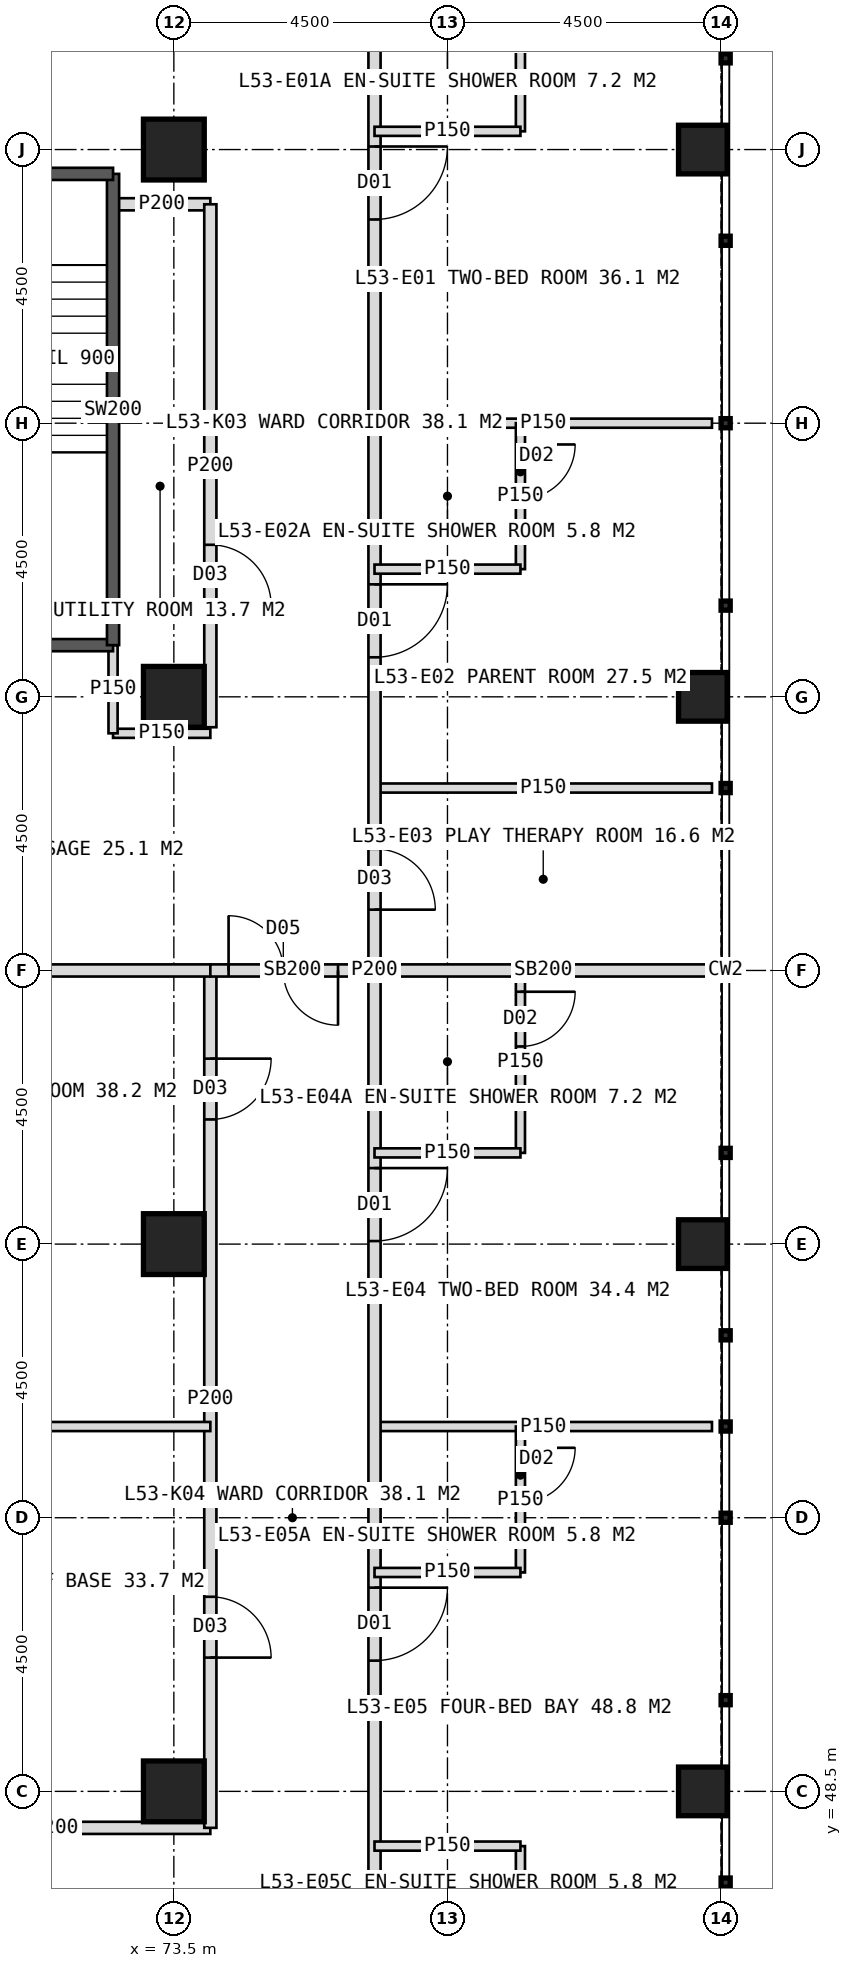
"""IFC4 building model, lengths in metres.
Left out: names, types, materials, properties, quantities, classifications, styles, units other than length and angle.
Written with IfcOpenShell. Run it as: python <this file> out.ifc"""

import sys

from ifc_helpers import new_model, si_unit, direction, frame, frame_2d, origin, origin_2d, place, context, subcontext, project, spatial, rectangle, hollow_rectangle, extrude, element, fill, save


model = new_model("IFC4")
c1 = context("Model", 3, precision=1e-05, world=origin(), true_north=direction((0.0, 1.0)))
c2 = subcontext(c1, "Body", "Model", "MODEL_VIEW")
j1 = project(units=[si_unit("LENGTHUNIT", "METRE"), si_unit("PLANEANGLEUNIT", "RADIAN")], contexts=[c1])
p1 = place(None, origin())
s1 = spatial("IfcSite", under=j1, at=p1, CompositionType="ELEMENT")
p2 = place(p1, origin())
s2 = spatial("IfcBuilding", under=s1, at=p2, CompositionType="ELEMENT")
p3 = place(p2, frame((0.0, 0.0, 221.0)))
s3 = spatial("IfcBuildingStorey", under=s2, at=p3, CompositionType="ELEMENT", Elevation=221.0)
for number, where, z_axis, x_axis in (
    (1, (73.5, 48.5, 0.0), (0.0, 0.0, 1.0), (1.0, 0.0, 0.0)),
    (2, (73.5, 75.5, 0.0), (0.0, 0.0, 1.0), (1.0, 0.0, 0.0)),
    (3, (73.5, 57.5, 0.0), (0.0, 0.0, 1.0), (1.0, 0.0, 0.0)),
    (4, (73.5, 66.5, 0.0), (0.0, 0.0, 1.0), (1.0, 0.0, 0.0)),
):
    element("IfcColumn", number, at=place(p3, frame(where, z_axis=z_axis, x_axis=x_axis)), inside=s3, PredefinedType="COLUMN", context=c2, shape_type="SweptSolid", body=[
        extrude(hollow_rectangle(XDim=1.0, YDim=1.0, WallThickness=0.1, at=origin_2d()), origin(), (0.0, 0.0, 1.0), 4.0),
    ])
for number, where, z_axis, x_axis in (
    (5, (82.2, 48.5, 0.0), (0.0, 0.0, 1.0), (1.0, 0.0, 0.0)),
    (6, (82.2, 57.5, 0.0), (0.0, 0.0, 1.0), (1.0, 0.0, 0.0)),
    (7, (82.2, 66.5, 0.0), (0.0, 0.0, 1.0), (1.0, 0.0, 0.0)),
    (8, (82.2, 75.5, 0.0), (0.0, 0.0, 1.0), (1.0, 0.0, 0.0)),
):
    element("IfcColumn", number, at=place(p3, frame(where, z_axis=z_axis, x_axis=x_axis)), inside=s3, PredefinedType="COLUMN", context=c2, shape_type="SweptSolid", body=[
        extrude(hollow_rectangle(XDim=0.8, YDim=0.8, WallThickness=0.08, at=origin_2d()), origin(), (0.0, 0.0, 1.0), 4.0),
    ])
p4 = place(p3, frame((72.5, 74.6, 0.0), z_axis=(0.0, 0.0, 1.0), x_axis=(1.0, 0.0, 0.0)))
e9 = element("IfcWall", 9, at=p4, inside=s3, PredefinedType="PARTITIONING", context=c2, shape_type="SweptSolid", body=[
    extrude(rectangle(XDim=1.6, YDim=0.2, at=frame_2d((0.8, 0.0))), origin(), (0.0, 0.0, 1.0), 3.75),
])
p5 = place(p3, frame((74.1, 47.9, 0.0), z_axis=(0.0, 0.0, 1.0), x_axis=(-1.0, 0.0, 0.0)))
e10 = element("IfcWall", 10, at=p5, inside=s3, PredefinedType="PARTITIONING", context=c2, shape_type="SweptSolid", body=[
    extrude(rectangle(XDim=5.1, YDim=0.2, at=frame_2d((2.55, 0.0))), origin(), (0.0, 0.0, 1.0), 3.75),
])
for number, where, z_axis, x_axis in (
    (11, (76.8, 71.0, 0.0), (0.0, 0.0, 1.0), (1.0, 0.0, 0.0)),
    (12, (76.8, 65.0, 0.0), (0.0, 0.0, 1.0), (1.0, 0.0, 0.0)),
):
    element("IfcWall", number, at=place(p3, frame(where, z_axis=z_axis, x_axis=x_axis)), inside=s3, PredefinedType="PARTITIONING", context=c2, shape_type="SweptSolid", body=[
        extrude(rectangle(XDim=5.55, YDim=0.15, at=frame_2d((2.775, 0.0))), origin(), (0.0, 0.0, 1.0), 3.75),
    ])
p6 = place(p3, frame((76.8, 62.0, 0.0), z_axis=(0.0, 0.0, 1.0), x_axis=(1.0, 0.0, 0.0)))
e13 = element("IfcWall", 13, at=p6, inside=s3, PredefinedType="SOLIDWALL", context=c2, shape_type="SweptSolid", body=[
    extrude(rectangle(XDim=5.55, YDim=0.2, at=frame_2d((2.775, 0.0))), origin(), (0.0, 0.0, 1.0), 2.95),
])
p7 = place(p3, frame((76.8, 54.5, 0.0), z_axis=(0.0, 0.0, 1.0), x_axis=(1.0, 0.0, 0.0)))
e14 = element("IfcWall", 14, at=p7, inside=s3, PredefinedType="PARTITIONING", context=c2, shape_type="SweptSolid", body=[
    extrude(rectangle(XDim=5.55, YDim=0.15, at=frame_2d((2.775, 0.0))), origin(), (0.0, 0.0, 1.0), 3.75),
])
p8 = place(p3, frame((76.8, 78.8, 0.0), z_axis=(0.0, 0.0, 1.0), x_axis=(0.0, -1.0, 0.0)))
e15 = element("IfcWall", 15, at=p8, inside=s3, PredefinedType="PARTITIONING", context=c2, shape_type="SweptSolid", body=[
    extrude(rectangle(XDim=33.6, YDim=0.2, at=frame_2d((16.8, 0.0))), origin(), (0.0, 0.0, 1.0), 3.75),
])
p9 = place(p8, frame((3.25, 0.0, 0.0)))
e16 = element("IfcOpeningElement", 16, at=p9, cuts=e15, PredefinedType="OPENING", context=c2, shape_type="SweptSolid", body=[
    extrude(rectangle(XDim=1.2, YDim=2.2, at=frame_2d((0.6, 1.1))), frame((0.0, 0.11, 0.0), z_axis=(0.0, -1.0, 0.0), x_axis=(1.0, 0.0, 0.0)), (0.0, 0.0, 1.0), 0.22),
])
p10 = place(p8, frame((10.45, 0.0, 0.0)))
e17 = element("IfcOpeningElement", 17, at=p10, cuts=e15, PredefinedType="OPENING", context=c2, shape_type="SweptSolid", body=[
    extrude(rectangle(XDim=1.2, YDim=2.2, at=frame_2d((0.6, 1.1))), frame((0.0, 0.11, 0.0), z_axis=(0.0, -1.0, 0.0), x_axis=(1.0, 0.0, 0.0)), (0.0, 0.0, 1.0), 0.22),
])
p11 = place(p8, frame((14.8, 0.0, 0.0)))
e18 = element("IfcOpeningElement", 18, at=p11, cuts=e15, PredefinedType="OPENING", context=c2, shape_type="SweptSolid", body=[
    extrude(rectangle(XDim=1.0, YDim=2.1, at=frame_2d((0.5, 1.05))), frame((0.0, 0.11, 0.0), z_axis=(0.0, -1.0, 0.0), x_axis=(1.0, 0.0, 0.0)), (0.0, 0.0, 1.0), 0.22),
])
p12 = place(p8, frame((20.05, 0.0, 0.0)))
e19 = element("IfcOpeningElement", 19, at=p12, cuts=e15, PredefinedType="OPENING", context=c2, shape_type="SweptSolid", body=[
    extrude(rectangle(XDim=1.2, YDim=2.2, at=frame_2d((0.6, 1.1))), frame((0.0, 0.11, 0.0), z_axis=(0.0, -1.0, 0.0), x_axis=(1.0, 0.0, 0.0)), (0.0, 0.0, 1.0), 0.22),
])
p13 = place(p8, frame((26.95, 0.0, 0.0)))
e20 = element("IfcOpeningElement", 20, at=p13, cuts=e15, PredefinedType="OPENING", context=c2, shape_type="SweptSolid", body=[
    extrude(rectangle(XDim=1.2, YDim=2.2, at=frame_2d((0.6, 1.1))), frame((0.0, 0.11, 0.0), z_axis=(0.0, -1.0, 0.0), x_axis=(1.0, 0.0, 0.0)), (0.0, 0.0, 1.0), 0.22),
])
p14 = place(p3, frame((79.2, 78.8, 0.0), z_axis=(0.0, 0.0, 1.0), x_axis=(0.0, -1.0, 0.0)))
e21 = element("IfcWall", 21, at=p14, inside=s3, PredefinedType="PARTITIONING", context=c2, shape_type="SweptSolid", body=[
    extrude(rectangle(XDim=3.0, YDim=0.15, at=frame_2d((1.5, 0.0))), origin(), (0.0, 0.0, 1.0), 3.75),
])
p15 = place(p14, frame((0.35, 0.0, 0.0)))
e22 = element("IfcOpeningElement", 22, at=p15, cuts=e21, PredefinedType="OPENING", context=c2, shape_type="SweptSolid", body=[
    extrude(rectangle(XDim=0.9, YDim=2.1, at=frame_2d((0.45, 1.05))), frame((0.0, 0.085, 0.0), z_axis=(0.0, -1.0, 0.0), x_axis=(1.0, 0.0, 0.0)), (0.0, 0.0, 1.0), 0.17),
])
p16 = place(p3, frame((76.8, 75.8, 0.0), z_axis=(0.0, 0.0, 1.0), x_axis=(1.0, 0.0, 0.0)))
e23 = element("IfcWall", 23, at=p16, inside=s3, PredefinedType="PARTITIONING", context=c2, shape_type="SweptSolid", body=[
    extrude(rectangle(XDim=2.4, YDim=0.15, at=frame_2d((1.2, 0.0))), origin(), (0.0, 0.0, 1.0), 3.75),
])
p17 = place(p3, frame((79.2, 71.0, 0.0), z_axis=(0.0, 0.0, 1.0), x_axis=(0.0, -1.0, 0.0)))
e24 = element("IfcWall", 24, at=p17, inside=s3, PredefinedType="PARTITIONING", context=c2, shape_type="SweptSolid", body=[
    extrude(rectangle(XDim=2.4, YDim=0.15, at=frame_2d((1.2, 0.0))), origin(), (0.0, 0.0, 1.0), 3.75),
])
p18 = place(p17, frame((0.35, 0.0, 0.0)))
e25 = element("IfcOpeningElement", 25, at=p18, cuts=e24, PredefinedType="OPENING", context=c2, shape_type="SweptSolid", body=[
    extrude(rectangle(XDim=0.9, YDim=2.1, at=frame_2d((0.45, 1.05))), frame((0.0, 0.085, 0.0), z_axis=(0.0, -1.0, 0.0), x_axis=(1.0, 0.0, 0.0)), (0.0, 0.0, 1.0), 0.17),
])
p19 = place(p3, frame((76.8, 68.6, 0.0), z_axis=(0.0, 0.0, 1.0), x_axis=(1.0, 0.0, 0.0)))
e26 = element("IfcWall", 26, at=p19, inside=s3, PredefinedType="PARTITIONING", context=c2, shape_type="SweptSolid", body=[
    extrude(rectangle(XDim=2.4, YDim=0.15, at=frame_2d((1.2, 0.0))), origin(), (0.0, 0.0, 1.0), 3.75),
])
p20 = place(p3, frame((79.2, 62.0, 0.0), z_axis=(0.0, 0.0, 1.0), x_axis=(0.0, -1.0, 0.0)))
e27 = element("IfcWall", 27, at=p20, inside=s3, PredefinedType="PARTITIONING", context=c2, shape_type="SweptSolid", body=[
    extrude(rectangle(XDim=3.0, YDim=0.15, at=frame_2d((1.5, 0.0))), origin(), (0.0, 0.0, 1.0), 3.75),
])
p21 = place(p20, frame((0.35, 0.0, 0.0)))
e28 = element("IfcOpeningElement", 28, at=p21, cuts=e27, PredefinedType="OPENING", context=c2, shape_type="SweptSolid", body=[
    extrude(rectangle(XDim=0.9, YDim=2.1, at=frame_2d((0.45, 1.05))), frame((0.0, 0.085, 0.0), z_axis=(0.0, -1.0, 0.0), x_axis=(1.0, 0.0, 0.0)), (0.0, 0.0, 1.0), 0.17),
])
p22 = place(p3, frame((76.8, 59.0, 0.0), z_axis=(0.0, 0.0, 1.0), x_axis=(1.0, 0.0, 0.0)))
e29 = element("IfcWall", 29, at=p22, inside=s3, PredefinedType="PARTITIONING", context=c2, shape_type="SweptSolid", body=[
    extrude(rectangle(XDim=2.4, YDim=0.15, at=frame_2d((1.2, 0.0))), origin(), (0.0, 0.0, 1.0), 3.75),
])
p23 = place(p3, frame((79.2, 54.5, 0.0), z_axis=(0.0, 0.0, 1.0), x_axis=(0.0, -1.0, 0.0)))
e30 = element("IfcWall", 30, at=p23, inside=s3, PredefinedType="PARTITIONING", context=c2, shape_type="SweptSolid", body=[
    extrude(rectangle(XDim=2.4, YDim=0.15, at=frame_2d((1.2, 0.0))), origin(), (0.0, 0.0, 1.0), 3.75),
])
p24 = place(p23, frame((0.35, 0.0, 0.0)))
e31 = element("IfcOpeningElement", 31, at=p24, cuts=e30, PredefinedType="OPENING", context=c2, shape_type="SweptSolid", body=[
    extrude(rectangle(XDim=0.9, YDim=2.1, at=frame_2d((0.45, 1.05))), frame((0.0, 0.085, 0.0), z_axis=(0.0, -1.0, 0.0), x_axis=(1.0, 0.0, 0.0)), (0.0, 0.0, 1.0), 0.17),
])
p25 = place(p3, frame((76.8, 52.1, 0.0), z_axis=(0.0, 0.0, 1.0), x_axis=(1.0, 0.0, 0.0)))
e32 = element("IfcWall", 32, at=p25, inside=s3, PredefinedType="PARTITIONING", context=c2, shape_type="SweptSolid", body=[
    extrude(rectangle(XDim=2.4, YDim=0.15, at=frame_2d((1.2, 0.0))), origin(), (0.0, 0.0, 1.0), 3.75),
])
p26 = place(p3, frame((79.2, 47.6, 0.0), z_axis=(0.0, 0.0, 1.0), x_axis=(0.0, -1.0, 0.0)))
e33 = element("IfcWall", 33, at=p26, inside=s3, PredefinedType="PARTITIONING", context=c2, shape_type="SweptSolid", body=[
    extrude(rectangle(XDim=2.4, YDim=0.15, at=frame_2d((1.2, 0.0))), origin(), (0.0, 0.0, 1.0), 3.75),
])
p27 = place(p26, frame((1.15, 0.0, 0.0)))
e34 = element("IfcOpeningElement", 34, at=p27, cuts=e33, PredefinedType="OPENING", context=c2, shape_type="SweptSolid", body=[
    extrude(rectangle(XDim=0.9, YDim=2.1, at=frame_2d((0.45, 1.05))), frame((0.0, 0.085, 0.0), z_axis=(0.0, -1.0, 0.0), x_axis=(1.0, 0.0, 0.0)), (0.0, 0.0, 1.0), 0.17),
])
p28 = place(p3, frame((76.8, 47.6, 0.0), z_axis=(0.0, 0.0, 1.0), x_axis=(1.0, 0.0, 0.0)))
e35 = element("IfcWall", 35, at=p28, inside=s3, PredefinedType="PARTITIONING", context=c2, shape_type="SweptSolid", body=[
    extrude(rectangle(XDim=2.4, YDim=0.15, at=frame_2d((1.2, 0.0))), origin(), (0.0, 0.0, 1.0), 3.75),
])
p29 = place(p3, frame((74.1, 74.6, 0.0), z_axis=(0.0, 0.0, 1.0), x_axis=(0.0, -1.0, 0.0)))
e36 = element("IfcWall", 36, at=p29, inside=s3, PredefinedType="PARTITIONING", context=c2, shape_type="SweptSolid", body=[
    extrude(rectangle(XDim=8.6, YDim=0.2, at=frame_2d((4.3, 0.0))), origin(), (0.0, 0.0, 1.0), 3.75),
])
p30 = place(p29, frame((5.6, 0.0, 0.0)))
e37 = element("IfcOpeningElement", 37, at=p30, cuts=e36, PredefinedType="OPENING", context=c2, shape_type="SweptSolid", body=[
    extrude(rectangle(XDim=1.0, YDim=2.1, at=frame_2d((0.5, 1.05))), frame((0.0, 0.11, 0.0), z_axis=(0.0, -1.0, 0.0), x_axis=(1.0, 0.0, 0.0)), (0.0, 0.0, 1.0), 0.22),
])
p31 = place(p3, frame((74.1, 62.0, 0.0), z_axis=(0.0, 0.0, 1.0), x_axis=(0.0, -1.0, 0.0)))
e38 = element("IfcWall", 38, at=p31, inside=s3, PredefinedType="PARTITIONING", context=c2, shape_type="SweptSolid", body=[
    extrude(rectangle(XDim=14.1, YDim=0.2, at=frame_2d((7.05, 0.0))), origin(), (0.0, 0.0, 1.0), 3.75),
])
p32 = place(p31, frame((1.45, 0.0, 0.0)))
e39 = element("IfcOpeningElement", 39, at=p32, cuts=e38, PredefinedType="OPENING", context=c2, shape_type="SweptSolid", body=[
    extrude(rectangle(XDim=1.0, YDim=2.1, at=frame_2d((0.5, 1.05))), frame((0.0, 0.11, 0.0), z_axis=(0.0, -1.0, 0.0), x_axis=(1.0, 0.0, 0.0)), (0.0, 0.0, 1.0), 0.22),
])
p33 = place(p31, frame((10.3, 0.0, 0.0)))
e40 = element("IfcOpeningElement", 40, at=p33, cuts=e38, PredefinedType="OPENING", context=c2, shape_type="SweptSolid", body=[
    extrude(rectangle(XDim=1.0, YDim=2.1, at=frame_2d((0.5, 1.05))), frame((0.0, 0.11, 0.0), z_axis=(0.0, -1.0, 0.0), x_axis=(1.0, 0.0, 0.0)), (0.0, 0.0, 1.0), 0.22),
])
p34 = place(p3, frame((72.5, 65.9, 0.0), z_axis=(0.0, 0.0, 1.0), x_axis=(1.0, 0.0, 0.0)))
e41 = element("IfcWall", 41, at=p34, inside=s3, PredefinedType="PARTITIONING", context=c2, shape_type="SweptSolid", body=[
    extrude(rectangle(XDim=1.6, YDim=0.15, at=frame_2d((0.8, 0.0))), origin(), (0.0, 0.0, 1.0), 3.75),
])
p35 = place(p3, frame((69.0, 62.0, 0.0), z_axis=(0.0, 0.0, 1.0), x_axis=(1.0, 0.0, 0.0)))
e42 = element("IfcWall", 42, at=p35, inside=s3, PredefinedType="SOLIDWALL", context=c2, shape_type="SweptSolid", body=[
    extrude(rectangle(XDim=5.1, YDim=0.2, at=frame_2d((2.55, 0.0))), origin(), (0.0, 0.0, 1.0), 2.95),
])
p36 = place(p3, frame((69.0, 54.5, 0.0), z_axis=(0.0, 0.0, 1.0), x_axis=(1.0, 0.0, 0.0)))
e43 = element("IfcWall", 43, at=p36, inside=s3, PredefinedType="PARTITIONING", context=c2, shape_type="SweptSolid", body=[
    extrude(rectangle(XDim=5.1, YDim=0.15, at=frame_2d((2.55, 0.0))), origin(), (0.0, 0.0, 1.0), 3.75),
])
p37 = place(p3, frame((74.1, 62.0, 0.0), z_axis=(0.0, 0.0, 1.0), x_axis=(1.0, 0.0, 0.0)))
e44 = element("IfcWall", 44, at=p37, inside=s3, PredefinedType="SOLIDWALL", context=c2, shape_type="SweptSolid", body=[
    extrude(rectangle(XDim=2.7, YDim=0.2, at=frame_2d((1.35, 0.0))), origin(), (0.0, 0.0, 1.0), 2.95),
])
p38 = place(p37, frame((0.3, 0.0, 0.0)))
e45 = element("IfcOpeningElement", 45, at=p38, cuts=e44, PredefinedType="OPENING", context=c2, shape_type="SweptSolid", body=[
    extrude(rectangle(XDim=1.8, YDim=2.2, at=frame_2d((0.9, 1.1))), frame((0.0, 0.11, 0.0), z_axis=(0.0, -1.0, 0.0), x_axis=(1.0, 0.0, 0.0)), (0.0, 0.0, 1.0), 0.22),
])
p39 = place(p3, frame((72.5, 65.9, 0.0), z_axis=(0.0, 0.0, 1.0), x_axis=(0.0, 1.0, 0.0)))
e46 = element("IfcWall", 46, at=p39, inside=s3, PredefinedType="PARTITIONING", context=c2, shape_type="SweptSolid", body=[
    extrude(rectangle(XDim=1.45, YDim=0.15, at=frame_2d((0.725, 0.0))), origin(), (0.0, 0.0, 1.0), 3.75),
])
p40 = place(p3, frame((69.0, 67.35, 0.0), z_axis=(0.0, 0.0, 1.0), x_axis=(1.0, 0.0, 0.0)))
e47 = element("IfcWall", 47, at=p40, inside=s3, PredefinedType="SOLIDWALL", context=c2, shape_type="SweptSolid", body=[
    extrude(rectangle(XDim=3.5, YDim=0.2, at=frame_2d((1.75, 0.0))), origin(), (0.0, 0.0, 1.0), 3.75),
])
p41 = place(p3, frame((72.5, 67.35, 0.0), z_axis=(0.0, 0.0, 1.0), x_axis=(0.0, 1.0, 0.0)))
e48 = element("IfcWall", 48, at=p41, inside=s3, PredefinedType="SOLIDWALL", context=c2, shape_type="SweptSolid", body=[
    extrude(rectangle(XDim=7.75, YDim=0.2, at=frame_2d((3.875, 0.0))), origin(), (0.0, 0.0, 1.0), 3.75),
])
p42 = place(p3, frame((69.0, 75.1, 0.0), z_axis=(0.0, 0.0, 1.0), x_axis=(1.0, 0.0, 0.0)))
e49 = element("IfcWall", 49, at=p42, inside=s3, PredefinedType="SOLIDWALL", context=c2, shape_type="SweptSolid", body=[
    extrude(rectangle(XDim=3.5, YDim=0.2, at=frame_2d((1.75, 0.0))), origin(), (0.0, 0.0, 1.0), 3.75),
])
p43 = place(p42, frame((1.15, 0.0, 0.0)))
e50 = element("IfcOpeningElement", 50, at=p43, cuts=e49, PredefinedType="OPENING", context=c2, shape_type="SweptSolid", body=[
    extrude(rectangle(XDim=1.2, YDim=2.1, at=frame_2d((0.6, 1.05))), frame((0.0, 0.11, 0.0), z_axis=(0.0, -1.0, 0.0), x_axis=(1.0, 0.0, 0.0)), (0.0, 0.0, 1.0), 0.22),
])
p44 = place(p9, origin())
e51 = element("IfcDoor", 51, at=p44, inside=s3, OperationType="SINGLE_SWING_LEFT", PredefinedType="DOOR", context=c2, shape_type="SweptSolid", body=[
    extrude(rectangle(XDim=1.2, YDim=2.2, at=frame_2d((0.6, 1.1))), frame((0.0, 0.025, 0.0), z_axis=(0.0, -1.0, 0.0), x_axis=(1.0, 0.0, 0.0)), (0.0, 0.0, 1.0), 0.05),
])
fill(e16, e51)
p45 = place(p10, origin())
e52 = element("IfcDoor", 52, at=p45, inside=s3, OperationType="SINGLE_SWING_LEFT", PredefinedType="DOOR", context=c2, shape_type="SweptSolid", body=[
    extrude(rectangle(XDim=1.2, YDim=2.2, at=frame_2d((0.6, 1.1))), frame((0.0, 0.025, 0.0), z_axis=(0.0, -1.0, 0.0), x_axis=(1.0, 0.0, 0.0)), (0.0, 0.0, 1.0), 0.05),
])
fill(e17, e52)
p46 = place(p18, origin())
e53 = element("IfcDoor", 53, at=p46, inside=s3, OperationType="SINGLE_SWING_LEFT", PredefinedType="DOOR", context=c2, shape_type="SweptSolid", body=[
    extrude(rectangle(XDim=0.9, YDim=2.1, at=frame_2d((0.45, 1.05))), frame((0.0, 0.025, 0.0), z_axis=(0.0, -1.0, 0.0), x_axis=(1.0, 0.0, 0.0)), (0.0, 0.0, 1.0), 0.05),
])
fill(e25, e53)
p47 = place(p11, origin())
e54 = element("IfcDoor", 54, at=p47, inside=s3, OperationType="SINGLE_SWING_RIGHT", PredefinedType="DOOR", context=c2, shape_type="SweptSolid", body=[
    extrude(rectangle(XDim=1.0, YDim=2.1, at=frame_2d((0.5, 1.05))), frame((0.0, 0.025, 0.0), z_axis=(0.0, -1.0, 0.0), x_axis=(1.0, 0.0, 0.0)), (0.0, 0.0, 1.0), 0.05),
])
fill(e18, e54)
p48 = place(p12, origin())
e55 = element("IfcDoor", 55, at=p48, inside=s3, OperationType="SINGLE_SWING_LEFT", PredefinedType="DOOR", context=c2, shape_type="SweptSolid", body=[
    extrude(rectangle(XDim=1.2, YDim=2.2, at=frame_2d((0.6, 1.1))), frame((0.0, 0.025, 0.0), z_axis=(0.0, -1.0, 0.0), x_axis=(1.0, 0.0, 0.0)), (0.0, 0.0, 1.0), 0.05),
])
fill(e19, e55)
p49 = place(p21, origin())
e56 = element("IfcDoor", 56, at=p49, inside=s3, OperationType="SINGLE_SWING_LEFT", PredefinedType="DOOR", context=c2, shape_type="SweptSolid", body=[
    extrude(rectangle(XDim=0.9, YDim=2.1, at=frame_2d((0.45, 1.05))), frame((0.0, 0.025, 0.0), z_axis=(0.0, -1.0, 0.0), x_axis=(1.0, 0.0, 0.0)), (0.0, 0.0, 1.0), 0.05),
])
fill(e28, e56)
p50 = place(p13, origin())
e57 = element("IfcDoor", 57, at=p50, inside=s3, OperationType="SINGLE_SWING_LEFT", PredefinedType="DOOR", context=c2, shape_type="SweptSolid", body=[
    extrude(rectangle(XDim=1.2, YDim=2.2, at=frame_2d((0.6, 1.1))), frame((0.0, 0.025, 0.0), z_axis=(0.0, -1.0, 0.0), x_axis=(1.0, 0.0, 0.0)), (0.0, 0.0, 1.0), 0.05),
])
fill(e20, e57)
p51 = place(p24, origin())
e58 = element("IfcDoor", 58, at=p51, inside=s3, OperationType="SINGLE_SWING_LEFT", PredefinedType="DOOR", context=c2, shape_type="SweptSolid", body=[
    extrude(rectangle(XDim=0.9, YDim=2.1, at=frame_2d((0.45, 1.05))), frame((0.0, 0.025, 0.0), z_axis=(0.0, -1.0, 0.0), x_axis=(1.0, 0.0, 0.0)), (0.0, 0.0, 1.0), 0.05),
])
fill(e31, e58)
p52 = place(p30, origin())
e59 = element("IfcDoor", 59, at=p52, inside=s3, OperationType="SINGLE_SWING_RIGHT", PredefinedType="DOOR", context=c2, shape_type="SweptSolid", body=[
    extrude(rectangle(XDim=1.0, YDim=2.1, at=frame_2d((0.5, 1.05))), frame((0.0, 0.025, 0.0), z_axis=(0.0, -1.0, 0.0), x_axis=(1.0, 0.0, 0.0)), (0.0, 0.0, 1.0), 0.05),
])
fill(e37, e59)
p53 = place(p32, origin())
e60 = element("IfcDoor", 60, at=p53, inside=s3, OperationType="SINGLE_SWING_LEFT", PredefinedType="DOOR", context=c2, shape_type="SweptSolid", body=[
    extrude(rectangle(XDim=1.0, YDim=2.1, at=frame_2d((0.5, 1.05))), frame((0.0, 0.025, 0.0), z_axis=(0.0, -1.0, 0.0), x_axis=(1.0, 0.0, 0.0)), (0.0, 0.0, 1.0), 0.05),
])
fill(e39, e60)
p54 = place(p33, origin())
e61 = element("IfcDoor", 61, at=p54, inside=s3, OperationType="SINGLE_SWING_RIGHT", PredefinedType="DOOR", context=c2, shape_type="SweptSolid", body=[
    extrude(rectangle(XDim=1.0, YDim=2.1, at=frame_2d((0.5, 1.05))), frame((0.0, 0.025, 0.0), z_axis=(0.0, -1.0, 0.0), x_axis=(1.0, 0.0, 0.0)), (0.0, 0.0, 1.0), 0.05),
])
fill(e40, e61)
p55 = place(p38, origin())
e62 = element("IfcDoor", 62, at=p55, inside=s3, OperationType="DOUBLE_DOOR_DOUBLE_SWING", PredefinedType="DOOR", context=c2, shape_type="SweptSolid", body=[
    extrude(rectangle(XDim=1.8, YDim=2.2, at=frame_2d((0.9, 1.1))), frame((0.0, 0.025, 0.0), z_axis=(0.0, -1.0, 0.0), x_axis=(1.0, 0.0, 0.0)), (0.0, 0.0, 1.0), 0.05),
])
fill(e45, e62)
save(model, sys.argv[1])
